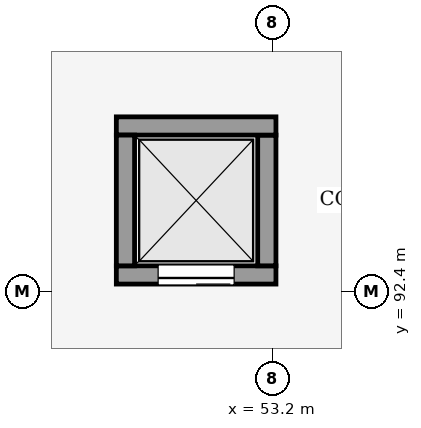
"""IFC4 building model, lengths in metres.
Left out: names, types, materials, properties, quantities, classifications, styles, units other than length and angle.
Written with IfcOpenShell. Run it as: python <this file> out.ifc"""

import sys

from ifc_helpers import new_model, si_unit, direction, frame, frame_2d, origin, place, context, subcontext, project, spatial, rectangle, extrude, element, fill, save


model = new_model("IFC4")
c1 = context("Model", 3, precision=1e-05, world=origin(), true_north=direction((0.0, 1.0)))
c2 = subcontext(c1, "Body", "Model", "MODEL_VIEW")
j1 = project(units=[si_unit("LENGTHUNIT", "METRE"), si_unit("PLANEANGLEUNIT", "RADIAN")], contexts=[c1])
p1 = place(None, origin())
s1 = spatial("IfcSite", under=j1, at=p1, CompositionType="ELEMENT")
p2 = place(p1, origin())
s2 = spatial("IfcBuilding", under=s1, at=p2, CompositionType="ELEMENT")
p3 = place(p2, frame((0.0, 0.0, 5.1)))
s3 = spatial("IfcBuildingStorey", under=s2, at=p3, CompositionType="ELEMENT", Elevation=5.1)
p4 = place(p3, frame((53.25, 92.62, 0.0), z_axis=(0.0, 0.0, 1.0), x_axis=(-1.0, 0.0, 0.0)))
e1 = element("IfcWall", 1, at=p4, inside=s3, PredefinedType="SHEAR", context=c2, shape_type="SweptSolid", body=[
    extrude(rectangle(XDim=2.1, YDim=0.24, at=frame_2d((1.05, 0.0))), origin(), (0.0, 0.0, 1.0), 4.05),
])
p5 = place(p4, frame((0.55, 0.0, 0.0)))
e2 = element("IfcOpeningElement", 2, at=p5, cuts=e1, PredefinedType="OPENING", context=c2, shape_type="SweptSolid", body=[
    extrude(rectangle(XDim=1.0, YDim=2.15, at=frame_2d((0.5, 1.075))), frame((0.0, 0.13, 0.0), z_axis=(0.0, -1.0, 0.0), x_axis=(1.0, 0.0, 0.0)), (0.0, 0.0, 1.0), 0.26),
])
p6 = place(p3, frame((53.13, 94.46, 0.0), z_axis=(0.0, 0.0, 1.0), x_axis=(0.0, -1.0, 0.0)))
e3 = element("IfcWall", 3, at=p6, inside=s3, PredefinedType="SHEAR", context=c2, shape_type="SweptSolid", body=[
    extrude(rectangle(XDim=1.72, YDim=0.24, at=frame_2d((0.86, 0.0))), origin(), (0.0, 0.0, 1.0), 4.05),
])
p7 = place(p3, frame((51.15, 94.58, 0.0), z_axis=(0.0, 0.0, 1.0), x_axis=(1.0, 0.0, 0.0)))
e4 = element("IfcWall", 4, at=p7, inside=s3, PredefinedType="SHEAR", context=c2, shape_type="SweptSolid", body=[
    extrude(rectangle(XDim=2.1, YDim=0.24, at=frame_2d((1.05, 0.0))), origin(), (0.0, 0.0, 1.0), 4.05),
])
p8 = place(p3, frame((51.27, 92.74, 0.0), z_axis=(0.0, 0.0, 1.0), x_axis=(0.0, 1.0, 0.0)))
e5 = element("IfcWall", 5, at=p8, inside=s3, PredefinedType="SHEAR", context=c2, shape_type="SweptSolid", body=[
    extrude(rectangle(XDim=1.72, YDim=0.24, at=frame_2d((0.86, 0.0))), origin(), (0.0, 0.0, 1.0), 4.05),
])
p9 = place(p5, origin())
e6 = element("IfcDoor", 6, at=p9, inside=s3, OperationType="SLIDING_TO_LEFT", PredefinedType="DOOR", context=c2, shape_type="SweptSolid", body=[
    extrude(rectangle(XDim=1.0, YDim=2.15, at=frame_2d((0.5, 1.075))), frame((0.0, 0.025, 0.0), z_axis=(0.0, -1.0, 0.0), x_axis=(1.0, 0.0, 0.0)), (0.0, 0.0, 1.0), 0.05),
])
fill(e2, e6)
save(model, sys.argv[1])
